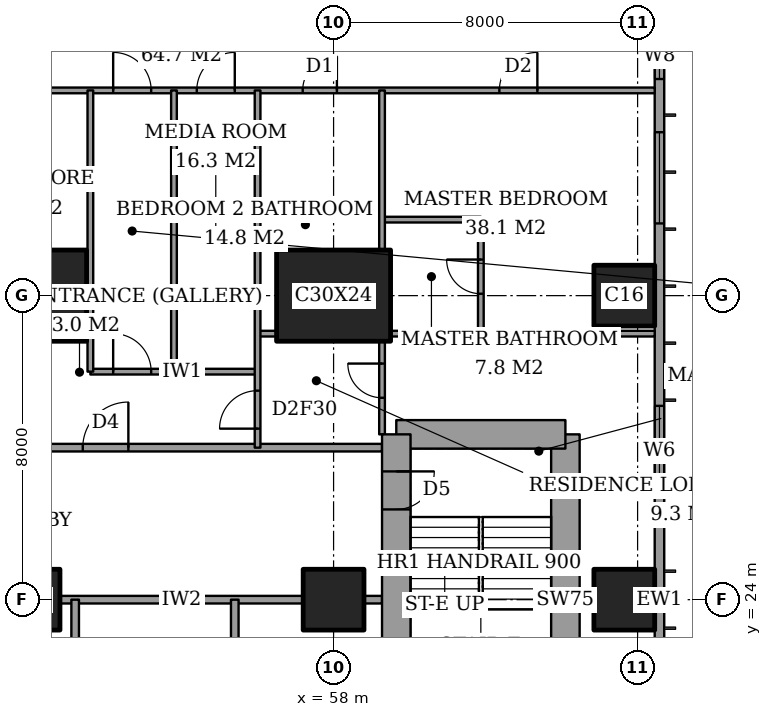
"""IFC4 building model, lengths in metres.
Left out: names, types, materials, properties, quantities, classifications, styles, units other than length and angle.
Written with IfcOpenShell. Run it as: python <this file> out.ifc"""

import sys

from ifc_helpers import new_model, si_unit, direction, frame, frame_2d, origin, origin_2d, place, context, subcontext, project, spatial, rectangle, extrude, element, fill, save


model = new_model("IFC4")
c1 = context("Model", 3, precision=1e-05, world=origin(), true_north=direction((0.0, 1.0)))
c2 = subcontext(c1, "Body", "Model", "MODEL_VIEW")
j1 = project(units=[si_unit("LENGTHUNIT", "METRE"), si_unit("PLANEANGLEUNIT", "RADIAN")], contexts=[c1])
p1 = place(None, origin())
s1 = spatial("IfcSite", under=j1, at=p1, CompositionType="ELEMENT")
p2 = place(p1, origin())
s2 = spatial("IfcBuilding", under=s1, at=p2, CompositionType="ELEMENT")
p3 = place(p2, frame((0.0, 0.0, 237.6)))
s3 = spatial("IfcBuildingStorey", under=s2, at=p3, CompositionType="ELEMENT", Elevation=237.6)
p4 = place(p3, frame((50.0, 24.0, 0.0), z_axis=(0.0, 0.0, 1.0), x_axis=(1.0, 0.0, 0.0)))
e1 = element("IfcColumn", 1, at=p4, inside=s3, PredefinedType="COLUMN", context=c2, shape_type="SweptSolid", body=[
    extrude(rectangle(XDim=1.6, YDim=1.6, at=origin_2d()), origin(), (0.0, 0.0, 1.0), 3.6),
])
p5 = place(p3, frame((50.0, 32.0, 0.0), z_axis=(0.0, 0.0, 1.0), x_axis=(1.0, 0.0, 0.0)))
e2 = element("IfcColumn", 2, at=p5, inside=s3, PredefinedType="COLUMN", context=c2, shape_type="SweptSolid", body=[
    extrude(rectangle(XDim=3.0, YDim=2.4, at=origin_2d()), origin(), (0.0, 0.0, 1.0), 3.6),
])
p6 = place(p3, frame((58.0, 24.0, 0.0), z_axis=(0.0, 0.0, 1.0), x_axis=(1.0, 0.0, 0.0)))
e3 = element("IfcColumn", 3, at=p6, inside=s3, PredefinedType="COLUMN", context=c2, shape_type="SweptSolid", body=[
    extrude(rectangle(XDim=1.6, YDim=1.6, at=origin_2d()), origin(), (0.0, 0.0, 1.0), 3.6),
])
p7 = place(p3, frame((58.0, 32.0, 0.0), z_axis=(0.0, 0.0, 1.0), x_axis=(1.0, 0.0, 0.0)))
e4 = element("IfcColumn", 4, at=p7, inside=s3, PredefinedType="COLUMN", context=c2, shape_type="SweptSolid", body=[
    extrude(rectangle(XDim=3.0, YDim=2.4, at=origin_2d()), origin(), (0.0, 0.0, 1.0), 3.6),
])
for number, where, z_axis, x_axis in (
    (5, (65.65, 24.0, 0.0), (0.0, 0.0, 1.0), (1.0, 0.0, 0.0)),
    (6, (65.65, 32.0, 0.0), (0.0, 0.0, 1.0), (1.0, 0.0, 0.0)),
):
    element("IfcColumn", number, at=place(p3, frame(where, z_axis=z_axis, x_axis=x_axis)), inside=s3, PredefinedType="COLUMN", context=c2, shape_type="SweptSolid", body=[
        extrude(rectangle(XDim=1.6, YDim=1.6, at=origin_2d()), origin(), (0.0, 0.0, 1.0), 3.6),
    ])
p8 = place(p3, frame((64.1, 19.65, 0.0), z_axis=(0.0, 0.0, 1.0), x_axis=(0.0, 1.0, 0.0)))
e7 = element("IfcWall", 7, at=p8, inside=s3, PredefinedType="SHEAR", context=c2, shape_type="SweptSolid", body=[
    extrude(rectangle(XDim=8.7, YDim=0.75, at=frame_2d((4.35, 0.0))), origin(), (0.0, 0.0, 1.0), 3.6),
])
p9 = place(p3, frame((64.1, 28.35, 0.0), z_axis=(0.0, 0.0, 1.0), x_axis=(-1.0, 0.0, 0.0)))
e8 = element("IfcWall", 8, at=p9, inside=s3, PredefinedType="SHEAR", context=c2, shape_type="SweptSolid", body=[
    extrude(rectangle(XDim=4.45, YDim=0.75, at=frame_2d((2.225, 0.0))), origin(), (0.0, 0.0, 1.0), 3.6),
])
p10 = place(p3, frame((59.65, 28.35, 0.0), z_axis=(0.0, 0.0, 1.0), x_axis=(0.0, -1.0, 0.0)))
e9 = element("IfcWall", 9, at=p10, inside=s3, PredefinedType="SHEAR", context=c2, shape_type="SweptSolid", body=[
    extrude(rectangle(XDim=8.7, YDim=0.75, at=frame_2d((4.35, 0.0))), origin(), (0.0, 0.0, 1.0), 3.6),
])
p11 = place(p10, frame((0.975, 0.0, 0.0)))
e10 = element("IfcOpeningElement", 10, at=p11, cuts=e9, PredefinedType="OPENING", context=c2, shape_type="SweptSolid", body=[
    extrude(rectangle(XDim=1.0, YDim=2.1, at=frame_2d((0.5, 1.05))), frame((0.0, 0.385, 0.0), z_axis=(0.0, -1.0, 0.0), x_axis=(1.0, 0.0, 0.0)), (0.0, 0.0, 1.0), 0.77),
])
p12 = place(p3, frame((66.575, 3.175, 0.0), z_axis=(0.0, 0.0, 1.0), x_axis=(0.0, 1.0, 0.0)))
e11 = element("IfcWall", 11, at=p12, inside=s3, PredefinedType="SOLIDWALL", context=c2, shape_type="SweptSolid", body=[
    extrude(rectangle(XDim=41.65, YDim=0.25, at=frame_2d((20.825, 0.0))), origin(), (0.0, 0.0, 1.0), 3.6),
])
p13 = place(p12, frame((0.875, 0.0, 0.6)))
e12 = element("IfcOpeningElement", 12, at=p13, cuts=e11, PredefinedType="OPENING", context=c2, shape_type="SweptSolid", body=[
    extrude(rectangle(XDim=2.4, YDim=2.0, at=frame_2d((1.2, 1.0))), frame((0.0, 0.135, 0.0), z_axis=(0.0, -1.0, 0.0), x_axis=(1.0, 0.0, 0.0)), (0.0, 0.0, 1.0), 0.27),
])
p14 = place(p12, frame((6.225, 0.0, 0.6)))
e13 = element("IfcOpeningElement", 13, at=p14, cuts=e11, PredefinedType="OPENING", context=c2, shape_type="SweptSolid", body=[
    extrude(rectangle(XDim=1.2, YDim=2.0, at=frame_2d((0.6, 1.0))), frame((0.0, 0.135, 0.0), z_axis=(0.0, -1.0, 0.0), x_axis=(1.0, 0.0, 0.0)), (0.0, 0.0, 1.0), 0.27),
])
p15 = place(p12, frame((8.725, 0.0, 0.6)))
e14 = element("IfcOpeningElement", 14, at=p15, cuts=e11, PredefinedType="OPENING", context=c2, shape_type="SweptSolid", body=[
    extrude(rectangle(XDim=2.4, YDim=2.0, at=frame_2d((1.2, 1.0))), frame((0.0, 0.135, 0.0), z_axis=(0.0, -1.0, 0.0), x_axis=(1.0, 0.0, 0.0)), (0.0, 0.0, 1.0), 0.27),
])
p16 = place(p12, frame((15.725, 0.0, 0.6)))
e15 = element("IfcOpeningElement", 15, at=p16, cuts=e11, PredefinedType="OPENING", context=c2, shape_type="SweptSolid", body=[
    extrude(rectangle(XDim=2.4, YDim=2.0, at=frame_2d((1.2, 1.0))), frame((0.0, 0.135, 0.0), z_axis=(0.0, -1.0, 0.0), x_axis=(1.0, 0.0, 0.0)), (0.0, 0.0, 1.0), 0.27),
])
p17 = place(p12, frame((23.525, 0.0, 0.6)))
e16 = element("IfcOpeningElement", 16, at=p17, cuts=e11, PredefinedType="OPENING", context=c2, shape_type="SweptSolid", body=[
    extrude(rectangle(XDim=2.4, YDim=2.0, at=frame_2d((1.2, 1.0))), frame((0.0, 0.135, 0.0), z_axis=(0.0, -1.0, 0.0), x_axis=(1.0, 0.0, 0.0)), (0.0, 0.0, 1.0), 0.27),
])
p18 = place(p12, frame((30.725, 0.0, 0.6)))
e17 = element("IfcOpeningElement", 17, at=p18, cuts=e11, PredefinedType="OPENING", context=c2, shape_type="SweptSolid", body=[
    extrude(rectangle(XDim=2.4, YDim=2.0, at=frame_2d((1.2, 1.0))), frame((0.0, 0.135, 0.0), z_axis=(0.0, -1.0, 0.0), x_axis=(1.0, 0.0, 0.0)), (0.0, 0.0, 1.0), 0.27),
])
p19 = place(p12, frame((34.525, 0.0, 0.6)))
e18 = element("IfcOpeningElement", 18, at=p19, cuts=e11, PredefinedType="OPENING", context=c2, shape_type="SweptSolid", body=[
    extrude(rectangle(XDim=1.2, YDim=2.0, at=frame_2d((0.6, 1.0))), frame((0.0, 0.135, 0.0), z_axis=(0.0, -1.0, 0.0), x_axis=(1.0, 0.0, 0.0)), (0.0, 0.0, 1.0), 0.27),
])
p20 = place(p12, frame((38.375, 0.0, 0.6)))
e19 = element("IfcOpeningElement", 19, at=p20, cuts=e11, PredefinedType="OPENING", context=c2, shape_type="SweptSolid", body=[
    extrude(rectangle(XDim=2.4, YDim=2.0, at=frame_2d((1.2, 1.0))), frame((0.0, 0.135, 0.0), z_axis=(0.0, -1.0, 0.0), x_axis=(1.0, 0.0, 0.0)), (0.0, 0.0, 1.0), 0.27),
])
p21 = place(p3, frame((50.8, 24.0, 0.0), z_axis=(0.0, 0.0, 1.0), x_axis=(1.0, 0.0, 0.0)))
e20 = element("IfcWall", 20, at=p21, inside=s3, PredefinedType="PARTITIONING", context=c2, shape_type="SweptSolid", body=[
    extrude(rectangle(XDim=6.4, YDim=0.2, at=frame_2d((3.2, 0.0))), origin(), (0.0, 0.0, 1.0), 3.35),
])
p22 = place(p3, frame((58.8, 24.0, 0.0), z_axis=(0.0, 0.0, 1.0), x_axis=(1.0, 0.0, 0.0)))
e21 = element("IfcWall", 21, at=p22, inside=s3, PredefinedType="PARTITIONING", context=c2, shape_type="SweptSolid", body=[
    extrude(rectangle(XDim=0.475, YDim=0.2, at=frame_2d((0.237, 0.0))), origin(), (0.0, 0.0, 1.0), 3.35),
])
p23 = place(p3, frame((64.475, 24.0, 0.0), z_axis=(0.0, 0.0, 1.0), x_axis=(1.0, 0.0, 0.0)))
e22 = element("IfcWall", 22, at=p23, inside=s3, PredefinedType="PARTITIONING", context=c2, shape_type="SweptSolid", body=[
    extrude(rectangle(XDim=0.375, YDim=0.15, at=frame_2d((0.188, 0.0))), origin(), (0.0, 0.0, 1.0), 3.35),
])
p24 = place(p3, frame((42.0, 28.0, 0.0), z_axis=(0.0, 0.0, 1.0), x_axis=(1.0, 0.0, 0.0)))
e23 = element("IfcWall", 23, at=p24, inside=s3, PredefinedType="PARTITIONING", context=c2, shape_type="SweptSolid", body=[
    extrude(rectangle(XDim=17.275, YDim=0.2, at=frame_2d((8.637, 0.0))), origin(), (0.0, 0.0, 1.0), 3.35),
])
p25 = place(p24, frame((9.4, 0.0, 0.0)))
e24 = element("IfcOpeningElement", 24, at=p25, cuts=e23, PredefinedType="OPENING", context=c2, shape_type="SweptSolid", body=[
    extrude(rectangle(XDim=1.2, YDim=2.4, at=frame_2d((0.6, 1.2))), frame((0.0, 0.11, 0.0), z_axis=(0.0, -1.0, 0.0), x_axis=(1.0, 0.0, 0.0)), (0.0, 0.0, 1.0), 0.22),
])
p26 = place(p3, frame((51.6, 30.0, 0.0), z_axis=(0.0, 0.0, 1.0), x_axis=(1.0, 0.0, 0.0)))
e25 = element("IfcWall", 25, at=p26, inside=s3, PredefinedType="PARTITIONING", context=c2, shape_type="SweptSolid", body=[
    extrude(rectangle(XDim=4.4, YDim=0.15, at=frame_2d((2.2, 0.0))), origin(), (0.0, 0.0, 1.0), 3.35),
])
p27 = place(p26, frame((0.6, 0.0, 0.0)))
e26 = element("IfcOpeningElement", 26, at=p27, cuts=e25, PredefinedType="OPENING", context=c2, shape_type="SweptSolid", body=[
    extrude(rectangle(XDim=1.0, YDim=2.1, at=frame_2d((0.5, 1.05))), frame((0.0, 0.085, 0.0), z_axis=(0.0, -1.0, 0.0), x_axis=(1.0, 0.0, 0.0)), (0.0, 0.0, 1.0), 0.17),
])
p28 = place(p3, frame((56.0, 31.0, 0.0), z_axis=(0.0, 0.0, 1.0), x_axis=(1.0, 0.0, 0.0)))
e27 = element("IfcWall", 27, at=p28, inside=s3, PredefinedType="PARTITIONING", context=c2, shape_type="SweptSolid", body=[
    extrude(rectangle(XDim=0.5, YDim=0.15, at=frame_2d((0.25, 0.0))), origin(), (0.0, 0.0, 1.0), 3.35),
])
p29 = place(p3, frame((59.5, 31.0, 0.0), z_axis=(0.0, 0.0, 1.0), x_axis=(1.0, 0.0, 0.0)))
e28 = element("IfcWall", 28, at=p29, inside=s3, PredefinedType="PARTITIONING", context=c2, shape_type="SweptSolid", body=[
    extrude(rectangle(XDim=6.95, YDim=0.15, at=frame_2d((3.475, 0.0))), origin(), (0.0, 0.0, 1.0), 3.35),
])
p30 = place(p3, frame((59.275, 34.0, 0.0), z_axis=(0.0, 0.0, 1.0), x_axis=(1.0, 0.0, 0.0)))
e29 = element("IfcWall", 29, at=p30, inside=s3, PredefinedType="PARTITIONING", context=c2, shape_type="SweptSolid", body=[
    extrude(rectangle(XDim=2.6, YDim=0.15, at=frame_2d((1.3, 0.0))), origin(), (0.0, 0.0, 1.0), 3.35),
])
p31 = place(p3, frame((41.439, 37.4, 0.0), z_axis=(0.0, 0.0, 1.0), x_axis=(1.0, 0.0, 0.0)))
e30 = element("IfcWall", 30, at=p31, inside=s3, PredefinedType="PARTITIONING", context=c2, shape_type="SweptSolid", body=[
    extrude(rectangle(XDim=25.011, YDim=0.15, at=frame_2d((12.505, 0.0))), origin(), (0.0, 0.0, 1.0), 3.35),
])
p32 = place(p31, frame((10.761, 0.0, 0.0)))
e31 = element("IfcOpeningElement", 31, at=p32, cuts=e30, PredefinedType="OPENING", context=c2, shape_type="SweptSolid", body=[
    extrude(rectangle(XDim=1.0, YDim=2.1, at=frame_2d((0.5, 1.05))), frame((0.0, 0.085, 0.0), z_axis=(0.0, -1.0, 0.0), x_axis=(1.0, 0.0, 0.0)), (0.0, 0.0, 1.0), 0.17),
])
p33 = place(p31, frame((20.924, 0.0, 0.0)))
e32 = element("IfcOpeningElement", 32, at=p33, cuts=e30, PredefinedType="OPENING", context=c2, shape_type="SweptSolid", body=[
    extrude(rectangle(XDim=1.0, YDim=2.1, at=frame_2d((0.5, 1.05))), frame((0.0, 0.085, 0.0), z_axis=(0.0, -1.0, 0.0), x_axis=(1.0, 0.0, 0.0)), (0.0, 0.0, 1.0), 0.17),
])
p34 = place(p31, frame((15.749, 0.0, 0.0)))
e33 = element("IfcOpeningElement", 33, at=p34, cuts=e30, PredefinedType="OPENING", context=c2, shape_type="SweptSolid", body=[
    extrude(rectangle(XDim=0.9, YDim=2.1, at=frame_2d((0.45, 1.05))), frame((0.0, 0.085, 0.0), z_axis=(0.0, -1.0, 0.0), x_axis=(1.0, 0.0, 0.0)), (0.0, 0.0, 1.0), 0.17),
])
p35 = place(p31, frame((12.961, 0.0, 0.0)))
e34 = element("IfcOpeningElement", 34, at=p35, cuts=e30, PredefinedType="OPENING", context=c2, shape_type="SweptSolid", body=[
    extrude(rectangle(XDim=1.0, YDim=2.1, at=frame_2d((0.5, 1.05))), frame((0.0, 0.085, 0.0), z_axis=(0.0, -1.0, 0.0), x_axis=(1.0, 0.0, 0.0)), (0.0, 0.0, 1.0), 0.17),
])
p36 = place(p31, frame((7.911, 0.0, 0.0)))
e35 = element("IfcOpeningElement", 35, at=p36, cuts=e30, PredefinedType="OPENING", context=c2, shape_type="SweptSolid", body=[
    extrude(rectangle(XDim=0.9, YDim=2.1, at=frame_2d((0.45, 1.05))), frame((0.0, 0.085, 0.0), z_axis=(0.0, -1.0, 0.0), x_axis=(1.0, 0.0, 0.0)), (0.0, 0.0, 1.0), 0.17),
])
p37 = place(p31, frame((2.836, 0.0, 0.0)))
e36 = element("IfcOpeningElement", 36, at=p37, cuts=e30, PredefinedType="OPENING", context=c2, shape_type="SweptSolid", body=[
    extrude(rectangle(XDim=1.0, YDim=2.1, at=frame_2d((0.5, 1.05))), frame((0.0, 0.085, 0.0), z_axis=(0.0, -1.0, 0.0), x_axis=(1.0, 0.0, 0.0)), (0.0, 0.0, 1.0), 0.17),
])
p38 = place(p3, frame((51.2, 21.6, 0.0), z_axis=(0.0, 0.0, 1.0), x_axis=(0.0, 1.0, 0.0)))
e37 = element("IfcWall", 37, at=p38, inside=s3, PredefinedType="PARTITIONING", context=c2, shape_type="SweptSolid", body=[
    extrude(rectangle(XDim=2.4, YDim=0.2, at=frame_2d((1.2, 0.0))), origin(), (0.0, 0.0, 1.0), 3.35),
])
for number, where, z_axis, x_axis in (
    (38, (51.6, 30.0, 0.0), (0.0, 0.0, 1.0), (0.0, 1.0, 0.0)),
    (39, (53.8, 30.0, 0.0), (0.0, 0.0, 1.0), (0.0, 1.0, 0.0)),
):
    element("IfcWall", number, at=place(p3, frame(where, z_axis=z_axis, x_axis=x_axis)), inside=s3, PredefinedType="PARTITIONING", context=c2, shape_type="SweptSolid", body=[
        extrude(rectangle(XDim=7.4, YDim=0.15, at=frame_2d((3.7, 0.0))), origin(), (0.0, 0.0, 1.0), 3.35),
    ])
p39 = place(p3, frame((55.4, 21.6, 0.0), z_axis=(0.0, 0.0, 1.0), x_axis=(0.0, 1.0, 0.0)))
e40 = element("IfcWall", 40, at=p39, inside=s3, PredefinedType="PARTITIONING", context=c2, shape_type="SweptSolid", body=[
    extrude(rectangle(XDim=2.4, YDim=0.2, at=frame_2d((1.2, 0.0))), origin(), (0.0, 0.0, 1.0), 3.35),
])
p40 = place(p3, frame((56.0, 28.0, 0.0), z_axis=(0.0, 0.0, 1.0), x_axis=(0.0, 1.0, 0.0)))
e41 = element("IfcWall", 41, at=p40, inside=s3, PredefinedType="PARTITIONING", context=c2, shape_type="SweptSolid", body=[
    extrude(rectangle(XDim=9.4, YDim=0.15, at=frame_2d((4.7, 0.0))), origin(), (0.0, 0.0, 1.0), 3.35),
])
p41 = place(p40, frame((0.5, 0.0, 0.0)))
e42 = element("IfcOpeningElement", 42, at=p41, cuts=e41, PredefinedType="OPENING", context=c2, shape_type="SweptSolid", body=[
    extrude(rectangle(XDim=1.0, YDim=2.1, at=frame_2d((0.5, 1.05))), frame((0.0, 0.085, 0.0), z_axis=(0.0, -1.0, 0.0), x_axis=(1.0, 0.0, 0.0)), (0.0, 0.0, 1.0), 0.17),
])
p42 = place(p3, frame((59.275, 28.35, 0.0), z_axis=(0.0, 0.0, 1.0), x_axis=(0.0, 1.0, 0.0)))
e43 = element("IfcWall", 43, at=p42, inside=s3, PredefinedType="PARTITIONING", context=c2, shape_type="SweptSolid", body=[
    extrude(rectangle(XDim=2.45, YDim=0.15, at=frame_2d((1.225, 0.0))), origin(), (0.0, 0.0, 1.0), 3.35),
])
p43 = place(p42, frame((0.962, 0.0, 0.0)))
e44 = element("IfcOpeningElement", 44, at=p43, cuts=e43, PredefinedType="OPENING", context=c2, shape_type="SweptSolid", body=[
    extrude(rectangle(XDim=0.9, YDim=2.1, at=frame_2d((0.45, 1.05))), frame((0.0, 0.085, 0.0), z_axis=(0.0, -1.0, 0.0), x_axis=(1.0, 0.0, 0.0)), (0.0, 0.0, 1.0), 0.17),
])
p44 = place(p3, frame((59.275, 33.2, 0.0), z_axis=(0.0, 0.0, 1.0), x_axis=(0.0, 1.0, 0.0)))
e45 = element("IfcWall", 45, at=p44, inside=s3, PredefinedType="PARTITIONING", context=c2, shape_type="SweptSolid", body=[
    extrude(rectangle(XDim=4.2, YDim=0.15, at=frame_2d((2.1, 0.0))), origin(), (0.0, 0.0, 1.0), 3.35),
])
p45 = place(p3, frame((61.875, 31.0, 0.0), z_axis=(0.0, 0.0, 1.0), x_axis=(0.0, 1.0, 0.0)))
e46 = element("IfcWall", 46, at=p45, inside=s3, PredefinedType="PARTITIONING", context=c2, shape_type="SweptSolid", body=[
    extrude(rectangle(XDim=3.0, YDim=0.15, at=frame_2d((1.5, 0.0))), origin(), (0.0, 0.0, 1.0), 3.35),
])
p46 = place(p45, frame((1.05, 0.0, 0.0)))
e47 = element("IfcOpeningElement", 47, at=p46, cuts=e46, PredefinedType="OPENING", context=c2, shape_type="SweptSolid", body=[
    extrude(rectangle(XDim=0.9, YDim=2.1, at=frame_2d((0.45, 1.05))), frame((0.0, 0.085, 0.0), z_axis=(0.0, -1.0, 0.0), x_axis=(1.0, 0.0, 0.0)), (0.0, 0.0, 1.0), 0.17),
])
p47 = place(p17, origin())
e48 = element("IfcWindow", 48, at=p47, inside=s3, PartitioningType="SINGLE_PANEL", PredefinedType="WINDOW", context=c2, shape_type="SweptSolid", body=[
    extrude(rectangle(XDim=2.4, YDim=2.0, at=frame_2d((1.2, 1.0))), frame((0.0, 0.03, 0.0), z_axis=(0.0, -1.0, 0.0), x_axis=(1.0, 0.0, 0.0)), (0.0, 0.0, 1.0), 0.06),
])
fill(e16, e48)
p48 = place(p18, origin())
e49 = element("IfcWindow", 49, at=p48, inside=s3, PartitioningType="SINGLE_PANEL", PredefinedType="WINDOW", context=c2, shape_type="SweptSolid", body=[
    extrude(rectangle(XDim=2.4, YDim=2.0, at=frame_2d((1.2, 1.0))), frame((0.0, 0.03, 0.0), z_axis=(0.0, -1.0, 0.0), x_axis=(1.0, 0.0, 0.0)), (0.0, 0.0, 1.0), 0.06),
])
fill(e17, e49)
p49 = place(p19, origin())
e50 = element("IfcWindow", 50, at=p49, inside=s3, PartitioningType="SINGLE_PANEL", PredefinedType="WINDOW", context=c2, shape_type="SweptSolid", body=[
    extrude(rectangle(XDim=1.2, YDim=2.0, at=frame_2d((0.6, 1.0))), frame((0.0, 0.03, 0.0), z_axis=(0.0, -1.0, 0.0), x_axis=(1.0, 0.0, 0.0)), (0.0, 0.0, 1.0), 0.06),
])
fill(e18, e50)
p50 = place(p32, origin())
e51 = element("IfcDoor", 51, at=p50, inside=s3, OperationType="SINGLE_SWING_RIGHT", PredefinedType="DOOR", context=c2, shape_type="SweptSolid", body=[
    extrude(rectangle(XDim=1.0, YDim=2.1, at=frame_2d((0.5, 1.05))), frame((0.0, 0.025, 0.0), z_axis=(0.0, -1.0, 0.0), x_axis=(1.0, 0.0, 0.0)), (0.0, 0.0, 1.0), 0.05),
])
fill(e31, e51)
p51 = place(p46, origin())
e52 = element("IfcDoor", 52, at=p51, inside=s3, OperationType="SINGLE_SWING_LEFT", PredefinedType="DOOR", context=c2, shape_type="SweptSolid", body=[
    extrude(rectangle(XDim=0.9, YDim=2.1, at=frame_2d((0.45, 1.05))), frame((0.0, 0.025, 0.0), z_axis=(0.0, -1.0, 0.0), x_axis=(1.0, 0.0, 0.0)), (0.0, 0.0, 1.0), 0.05),
])
fill(e47, e52)
p52 = place(p33, origin())
e53 = element("IfcDoor", 53, at=p52, inside=s3, OperationType="SINGLE_SWING_LEFT", PredefinedType="DOOR", context=c2, shape_type="SweptSolid", body=[
    extrude(rectangle(XDim=1.0, YDim=2.1, at=frame_2d((0.5, 1.05))), frame((0.0, 0.025, 0.0), z_axis=(0.0, -1.0, 0.0), x_axis=(1.0, 0.0, 0.0)), (0.0, 0.0, 1.0), 0.05),
])
fill(e32, e53)
p53 = place(p43, origin())
e54 = element("IfcDoor", 54, at=p53, inside=s3, OperationType="SINGLE_SWING_LEFT", PredefinedType="DOOR", context=c2, shape_type="SweptSolid", body=[
    extrude(rectangle(XDim=0.9, YDim=2.1, at=frame_2d((0.45, 1.05))), frame((0.0, 0.025, 0.0), z_axis=(0.0, -1.0, 0.0), x_axis=(1.0, 0.0, 0.0)), (0.0, 0.0, 1.0), 0.05),
])
fill(e44, e54)
p54 = place(p34, origin())
e55 = element("IfcDoor", 55, at=p54, inside=s3, OperationType="SINGLE_SWING_LEFT", PredefinedType="DOOR", context=c2, shape_type="SweptSolid", body=[
    extrude(rectangle(XDim=0.9, YDim=2.1, at=frame_2d((0.45, 1.05))), frame((0.0, 0.025, 0.0), z_axis=(0.0, -1.0, 0.0), x_axis=(1.0, 0.0, 0.0)), (0.0, 0.0, 1.0), 0.05),
])
fill(e33, e55)
p55 = place(p41, origin())
e56 = element("IfcDoor", 56, at=p55, inside=s3, OperationType="SINGLE_SWING_RIGHT", PredefinedType="DOOR", context=c2, shape_type="SweptSolid", body=[
    extrude(rectangle(XDim=1.0, YDim=2.1, at=frame_2d((0.5, 1.05))), frame((0.0, 0.025, 0.0), z_axis=(0.0, -1.0, 0.0), x_axis=(1.0, 0.0, 0.0)), (0.0, 0.0, 1.0), 0.05),
])
fill(e42, e56)
p56 = place(p25, origin())
e57 = element("IfcDoor", 57, at=p56, inside=s3, OperationType="SINGLE_SWING_LEFT", PredefinedType="DOOR", context=c2, shape_type="SweptSolid", body=[
    extrude(rectangle(XDim=1.2, YDim=2.4, at=frame_2d((0.6, 1.2))), frame((0.0, 0.025, 0.0), z_axis=(0.0, -1.0, 0.0), x_axis=(1.0, 0.0, 0.0)), (0.0, 0.0, 1.0), 0.05),
])
fill(e24, e57)
p57 = place(p35, origin())
e58 = element("IfcDoor", 58, at=p57, inside=s3, OperationType="SINGLE_SWING_LEFT", PredefinedType="DOOR", context=c2, shape_type="SweptSolid", body=[
    extrude(rectangle(XDim=1.0, YDim=2.1, at=frame_2d((0.5, 1.05))), frame((0.0, 0.025, 0.0), z_axis=(0.0, -1.0, 0.0), x_axis=(1.0, 0.0, 0.0)), (0.0, 0.0, 1.0), 0.05),
])
fill(e34, e58)
p58 = place(p27, origin())
e59 = element("IfcDoor", 59, at=p58, inside=s3, OperationType="SINGLE_SWING_RIGHT", PredefinedType="DOOR", context=c2, shape_type="SweptSolid", body=[
    extrude(rectangle(XDim=1.0, YDim=2.1, at=frame_2d((0.5, 1.05))), frame((0.0, 0.025, 0.0), z_axis=(0.0, -1.0, 0.0), x_axis=(1.0, 0.0, 0.0)), (0.0, 0.0, 1.0), 0.05),
])
fill(e26, e59)
p59 = place(p11, origin())
e60 = element("IfcDoor", 60, at=p59, inside=s3, OperationType="SINGLE_SWING_RIGHT", PredefinedType="DOOR", context=c2, shape_type="SweptSolid", body=[
    extrude(rectangle(XDim=1.0, YDim=2.1, at=frame_2d((0.5, 1.05))), frame((0.0, 0.025, 0.0), z_axis=(0.0, -1.0, 0.0), x_axis=(1.0, 0.0, 0.0)), (0.0, 0.0, 1.0), 0.05),
])
fill(e10, e60)
save(model, sys.argv[1])
